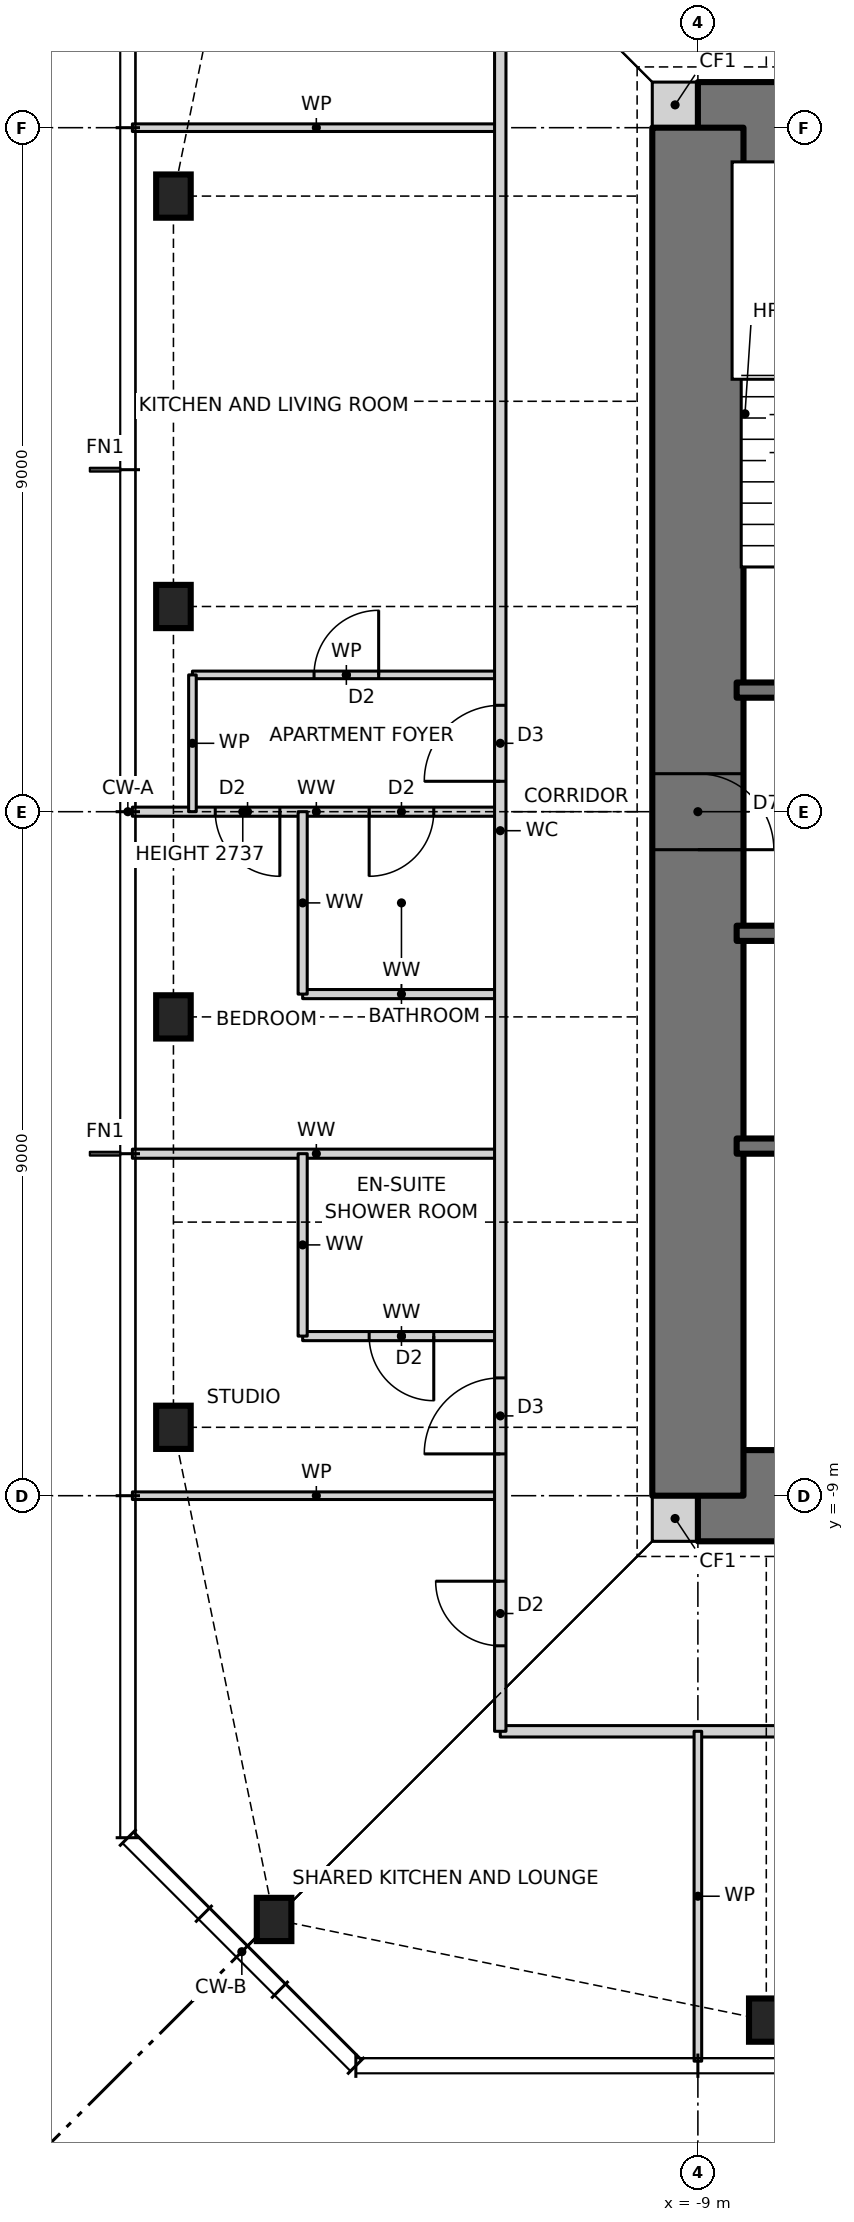
"""IFC4 building model, lengths in metres.
Left out: names, types, materials, properties, quantities, classifications, styles, units other than length and angle.
Written with IfcOpenShell. Run it as: python <this file> out.ifc"""

import sys

from ifc_helpers import new_model, si_unit, direction, frame, frame_2d, origin, origin_2d, place, context, subcontext, project, spatial, rectangle, i_section, extrude, element, fill, save


model = new_model("IFC4")
c1 = context("Model", 3, precision=1e-05, world=origin(), true_north=direction((0.0, 1.0)))
c2 = subcontext(c1, "Body", "Model", "MODEL_VIEW")
j1 = project(units=[si_unit("LENGTHUNIT", "METRE"), si_unit("PLANEANGLEUNIT", "RADIAN")], contexts=[c1])
p1 = place(None, origin())
s1 = spatial("IfcSite", under=j1, at=p1, CompositionType="ELEMENT")
p2 = place(p1, origin())
s2 = spatial("IfcBuilding", under=s1, at=p2, CompositionType="ELEMENT")
p3 = place(p2, frame((0.0, 0.0, 236.0)))
s3 = spatial("IfcBuildingStorey", under=s2, at=p3, CompositionType="ELEMENT", Elevation=236.0)
for number, where, z_axis, x_axis in (
    (1, (-14.576, -14.576, 0.0), (0.0, 0.0, 1.0), (1.0, 0.0, 0.0)),
    (2, (-8.1, -15.9, 0.0), (0.0, 0.0, 1.0), (1.0, 0.0, 0.0)),
    (3, (-15.9, 8.1, 0.0), (0.0, 0.0, 1.0), (1.0, 0.0, 0.0)),
    (4, (-15.9, 2.7, 0.0), (0.0, 0.0, 1.0), (1.0, 0.0, 0.0)),
    (5, (-15.9, -2.7, 0.0), (0.0, 0.0, 1.0), (1.0, 0.0, 0.0)),
    (6, (-15.9, -8.1, 0.0), (0.0, 0.0, 1.0), (1.0, 0.0, 0.0)),
):
    element("IfcColumn", number, at=place(p3, frame(where, z_axis=z_axis, x_axis=x_axis)), inside=s3, PredefinedType="COLUMN", context=c2, shape_type="SweptSolid", body=[
        extrude(i_section(OverallWidth=0.455, OverallDepth=0.569, WebThickness=0.078, FlangeThickness=0.125, at=origin_2d()), origin(), (0.0, 0.0, 1.0), 3.5),
    ])
for number, where, z_axis, x_axis in (
    (7, (-9.6, -9.3, 0.0), (0.0, 0.0, 1.0), (1.0, 0.0, 0.0)),
    (8, (-9.6, 9.3, 0.0), (0.0, 0.0, 1.0), (1.0, 0.0, 0.0)),
):
    element("IfcWall", number, at=place(p3, frame(where, z_axis=z_axis, x_axis=x_axis)), inside=s3, PredefinedType="SOLIDWALL", context=c2, shape_type="SweptSolid", body=[
        extrude(rectangle(XDim=0.6, YDim=0.6, at=frame_2d((0.3, 0.0))), origin(), (0.0, 0.0, 1.0), 3.5),
    ])
p4 = place(p3, frame((-9.0, -9.0, 0.0), z_axis=(0.0, 0.0, 1.0), x_axis=(1.0, 0.0, 0.0)))
e9 = element("IfcWall", 9, at=p4, inside=s3, PredefinedType="SHEAR", context=c2, shape_type="SweptSolid", body=[
    extrude(rectangle(XDim=18.0, YDim=1.2, at=frame_2d((9.0, 0.0))), origin(), (0.0, 0.0, 1.0), 3.5),
])
p5 = place(p4, frame((3.775, 0.0, 0.0)))
e10 = element("IfcOpeningElement", 10, at=p5, cuts=e9, PredefinedType="OPENING", context=c2, shape_type="SweptSolid", body=[
    extrude(rectangle(XDim=0.9, YDim=2.1, at=frame_2d((0.45, 1.05))), frame((0.0, 0.61, 0.0), z_axis=(0.0, -1.0, 0.0), x_axis=(1.0, 0.0, 0.0)), (0.0, 0.0, 1.0), 1.22),
])
p6 = place(p4, frame((10.625, 0.0, 0.0)))
e11 = element("IfcOpeningElement", 11, at=p6, cuts=e9, PredefinedType="OPENING", context=c2, shape_type="SweptSolid", body=[
    extrude(rectangle(XDim=0.9, YDim=2.1, at=frame_2d((0.45, 1.05))), frame((0.0, 0.61, 0.0), z_axis=(0.0, -1.0, 0.0), x_axis=(1.0, 0.0, 0.0)), (0.0, 0.0, 1.0), 1.22),
])
p7 = place(p3, frame((9.0, 9.0, 0.0), z_axis=(0.0, 0.0, 1.0), x_axis=(-1.0, 0.0, 0.0)))
e12 = element("IfcWall", 12, at=p7, inside=s3, PredefinedType="SHEAR", context=c2, shape_type="SweptSolid", body=[
    extrude(rectangle(XDim=18.0, YDim=1.2, at=frame_2d((9.0, 0.0))), origin(), (0.0, 0.0, 1.0), 3.5),
])
p8 = place(p7, frame((11.125, 0.0, 0.0)))
e13 = element("IfcOpeningElement", 13, at=p8, cuts=e12, PredefinedType="OPENING", context=c2, shape_type="SweptSolid", body=[
    extrude(rectangle(XDim=0.9, YDim=2.1, at=frame_2d((0.45, 1.05))), frame((0.0, 0.61, 0.0), z_axis=(0.0, -1.0, 0.0), x_axis=(1.0, 0.0, 0.0)), (0.0, 0.0, 1.0), 1.22),
])
p9 = place(p7, frame((4.275, 0.0, 0.0)))
e14 = element("IfcOpeningElement", 14, at=p9, cuts=e12, PredefinedType="OPENING", context=c2, shape_type="SweptSolid", body=[
    extrude(rectangle(XDim=0.9, YDim=2.1, at=frame_2d((0.45, 1.05))), frame((0.0, 0.61, 0.0), z_axis=(0.0, -1.0, 0.0), x_axis=(1.0, 0.0, 0.0)), (0.0, 0.0, 1.0), 1.22),
])
p10 = place(p3, frame((-9.0, 9.0, 0.0), z_axis=(0.0, 0.0, 1.0), x_axis=(0.0, -1.0, 0.0)))
e15 = element("IfcWall", 15, at=p10, inside=s3, PredefinedType="SHEAR", context=c2, shape_type="SweptSolid", body=[
    extrude(rectangle(XDim=18.0, YDim=1.2, at=frame_2d((9.0, 0.0))), origin(), (0.0, 0.0, 1.0), 3.5),
])
p11 = place(p10, frame((8.5, 0.0, 0.0)))
e16 = element("IfcOpeningElement", 16, at=p11, cuts=e15, PredefinedType="OPENING", context=c2, shape_type="SweptSolid", body=[
    extrude(rectangle(XDim=1.0, YDim=2.1, at=frame_2d((0.5, 1.05))), frame((0.0, 0.61, 0.0), z_axis=(0.0, -1.0, 0.0), x_axis=(1.0, 0.0, 0.0)), (0.0, 0.0, 1.0), 1.22),
])
p12 = place(p3, frame((-11.6, -12.1, 0.0), z_axis=(0.0, 0.0, 1.0), x_axis=(1.0, 0.0, 0.0)))
e17 = element("IfcWall", 17, at=p12, inside=s3, PredefinedType="PARTITIONING", context=c2, shape_type="SweptSolid", body=[
    extrude(rectangle(XDim=23.2, YDim=0.15, at=frame_2d((11.6, 0.0))), origin(), (0.0, 0.0, 1.0), 3.27),
])
p13 = place(p12, frame((10.2, 0.0, 0.0)))
e18 = element("IfcOpeningElement", 18, at=p13, cuts=e17, PredefinedType="OPENING", context=c2, shape_type="SweptSolid", body=[
    extrude(rectangle(XDim=1.0, YDim=2.1, at=frame_2d((0.5, 1.05))), frame((0.0, 0.085, 0.0), z_axis=(0.0, -1.0, 0.0), x_axis=(1.0, 0.0, 0.0)), (0.0, 0.0, 1.0), 0.17),
])
p14 = place(p12, frame((17.45, 0.0, 0.0)))
e19 = element("IfcOpeningElement", 19, at=p14, cuts=e17, PredefinedType="OPENING", context=c2, shape_type="SweptSolid", body=[
    extrude(rectangle(XDim=1.8, YDim=2.1, at=frame_2d((0.9, 1.05))), frame((0.0, 0.085, 0.0), z_axis=(0.0, -1.0, 0.0), x_axis=(1.0, 0.0, 0.0)), (0.0, 0.0, 1.0), 0.17),
])
p15 = place(p3, frame((-16.44, -9.0, 0.0), z_axis=(0.0, 0.0, 1.0), x_axis=(1.0, 0.0, 0.0)))
e20 = element("IfcWall", 20, at=p15, inside=s3, PredefinedType="PARTITIONING", context=c2, shape_type="SweptSolid", body=[
    extrude(rectangle(XDim=4.84, YDim=0.1, at=frame_2d((2.42, 0.0))), origin(), (0.0, 0.0, 1.0), 3.27),
])
p16 = place(p3, frame((-14.2, -6.9, 0.0), z_axis=(0.0, 0.0, 1.0), x_axis=(1.0, 0.0, 0.0)))
e21 = element("IfcWall", 21, at=p16, inside=s3, PredefinedType="PARTITIONING", context=c2, shape_type="SweptSolid", body=[
    extrude(rectangle(XDim=2.6, YDim=0.12, at=frame_2d((1.3, 0.0))), origin(), (0.0, 0.0, 1.0), 3.27),
])
p17 = place(p16, frame((0.875, 0.0, 0.0)))
e22 = element("IfcOpeningElement", 22, at=p17, cuts=e21, PredefinedType="OPENING", context=c2, shape_type="SweptSolid", body=[
    extrude(rectangle(XDim=0.85, YDim=2.1, at=frame_2d((0.425, 1.05))), frame((0.0, 0.07, 0.0), z_axis=(0.0, -1.0, 0.0), x_axis=(1.0, 0.0, 0.0)), (0.0, 0.0, 1.0), 0.14),
])
p18 = place(p3, frame((-16.44, -4.5, 0.0), z_axis=(0.0, 0.0, 1.0), x_axis=(1.0, 0.0, 0.0)))
e23 = element("IfcWall", 23, at=p18, inside=s3, PredefinedType="PARTITIONING", context=c2, shape_type="SweptSolid", body=[
    extrude(rectangle(XDim=4.84, YDim=0.12, at=frame_2d((2.42, 0.0))), origin(), (0.0, 0.0, 1.0), 3.27),
])
p19 = place(p3, frame((-8.49, -4.4, 0.0), z_axis=(0.0, 0.0, 1.0), x_axis=(1.0, 0.0, 0.0)))
e24 = element("IfcWall", 24, at=p19, inside=s3, PredefinedType="SOLIDWALL", context=c2, shape_type="SweptSolid", body=[
    extrude(rectangle(XDim=13.64, YDim=0.2, at=frame_2d((6.82, 0.0))), origin(), (0.0, 0.0, 1.0), 3.5),
])
p20 = place(p3, frame((-14.2, -2.4, 0.0), z_axis=(0.0, 0.0, 1.0), x_axis=(1.0, 0.0, 0.0)))
e25 = element("IfcWall", 25, at=p20, inside=s3, PredefinedType="PARTITIONING", context=c2, shape_type="SweptSolid", body=[
    extrude(rectangle(XDim=2.6, YDim=0.12, at=frame_2d((1.3, 0.0))), origin(), (0.0, 0.0, 1.0), 3.27),
])
p21 = place(p3, frame((-8.49, -1.6, 0.0), z_axis=(0.0, 0.0, 1.0), x_axis=(1.0, 0.0, 0.0)))
e26 = element("IfcWall", 26, at=p21, inside=s3, PredefinedType="SOLIDWALL", context=c2, shape_type="SweptSolid", body=[
    extrude(rectangle(XDim=16.98, YDim=0.2, at=frame_2d((8.49, 0.0))), origin(), (0.0, 0.0, 1.0), 3.5),
])
p22 = place(p21, frame((14.81, 0.0, 0.0)))
e27 = element("IfcOpeningElement", 27, at=p22, cuts=e26, PredefinedType="OPENING", context=c2, shape_type="SweptSolid", body=[
    extrude(rectangle(XDim=1.0, YDim=2.1, at=frame_2d((0.5, 1.05))), frame((0.0, 0.11, 0.0), z_axis=(0.0, -1.0, 0.0), x_axis=(1.0, 0.0, 0.0)), (0.0, 0.0, 1.0), 0.22),
])
p23 = place(p21, frame((1.232, 0.0, 0.0)))
e28 = element("IfcOpeningElement", 28, at=p23, cuts=e26, PredefinedType="OPENING", context=c2, shape_type="SweptSolid", body=[
    extrude(rectangle(XDim=0.9, YDim=2.1, at=frame_2d((0.45, 1.05))), frame((0.0, 0.11, 0.0), z_axis=(0.0, -1.0, 0.0), x_axis=(1.0, 0.0, 0.0)), (0.0, 0.0, 1.0), 0.22),
])
p24 = place(p21, frame((4.627, 0.0, 0.0)))
e29 = element("IfcOpeningElement", 29, at=p24, cuts=e26, PredefinedType="OPENING", context=c2, shape_type="SweptSolid", body=[
    extrude(rectangle(XDim=0.9, YDim=2.1, at=frame_2d((0.45, 1.05))), frame((0.0, 0.11, 0.0), z_axis=(0.0, -1.0, 0.0), x_axis=(1.0, 0.0, 0.0)), (0.0, 0.0, 1.0), 0.22),
])
p25 = place(p21, frame((8.052, 0.0, 0.0)))
e30 = element("IfcOpeningElement", 30, at=p25, cuts=e26, PredefinedType="OPENING", context=c2, shape_type="SweptSolid", body=[
    extrude(rectangle(XDim=0.9, YDim=2.1, at=frame_2d((0.45, 1.05))), frame((0.0, 0.11, 0.0), z_axis=(0.0, -1.0, 0.0), x_axis=(1.0, 0.0, 0.0)), (0.0, 0.0, 1.0), 0.22),
])
p26 = place(p21, frame((11.478, 0.0, 0.0)))
e31 = element("IfcOpeningElement", 31, at=p26, cuts=e26, PredefinedType="OPENING", context=c2, shape_type="SweptSolid", body=[
    extrude(rectangle(XDim=0.9, YDim=2.1, at=frame_2d((0.45, 1.05))), frame((0.0, 0.11, 0.0), z_axis=(0.0, -1.0, 0.0), x_axis=(1.0, 0.0, 0.0)), (0.0, 0.0, 1.0), 0.22),
])
p27 = place(p3, frame((-16.44, 0.0, 0.0), z_axis=(0.0, 0.0, 1.0), x_axis=(1.0, 0.0, 0.0)))
e32 = element("IfcWall", 32, at=p27, inside=s3, PredefinedType="PARTITIONING", context=c2, shape_type="SweptSolid", body=[
    extrude(rectangle(XDim=4.84, YDim=0.12, at=frame_2d((2.42, 0.0))), origin(), (0.0, 0.0, 1.0), 2.737),
])
p28 = place(p27, frame((1.09, 0.0, 0.0)))
e33 = element("IfcOpeningElement", 33, at=p28, cuts=e32, PredefinedType="OPENING", context=c2, shape_type="SweptSolid", body=[
    extrude(rectangle(XDim=0.85, YDim=2.1, at=frame_2d((0.425, 1.05))), frame((0.0, 0.07, 0.0), z_axis=(0.0, -1.0, 0.0), x_axis=(1.0, 0.0, 0.0)), (0.0, 0.0, 1.0), 0.14),
])
p29 = place(p27, frame((3.115, 0.0, 0.0)))
e34 = element("IfcOpeningElement", 34, at=p29, cuts=e32, PredefinedType="OPENING", context=c2, shape_type="SweptSolid", body=[
    extrude(rectangle(XDim=0.85, YDim=2.1, at=frame_2d((0.425, 1.05))), frame((0.0, 0.07, 0.0), z_axis=(0.0, -1.0, 0.0), x_axis=(1.0, 0.0, 0.0)), (0.0, 0.0, 1.0), 0.14),
])
p30 = place(p3, frame((-8.49, 1.6, 0.0), z_axis=(0.0, 0.0, 1.0), x_axis=(1.0, 0.0, 0.0)))
e35 = element("IfcWall", 35, at=p30, inside=s3, PredefinedType="SOLIDWALL", context=c2, shape_type="SweptSolid", body=[
    extrude(rectangle(XDim=16.98, YDim=0.2, at=frame_2d((8.49, 0.0))), origin(), (0.0, 0.0, 1.0), 3.5),
])
p31 = place(p30, frame((1.17, 0.0, 0.0)))
e36 = element("IfcOpeningElement", 36, at=p31, cuts=e35, PredefinedType="OPENING", context=c2, shape_type="SweptSolid", body=[
    extrude(rectangle(XDim=1.0, YDim=2.1, at=frame_2d((0.5, 1.05))), frame((0.0, 0.11, 0.0), z_axis=(0.0, -1.0, 0.0), x_axis=(1.0, 0.0, 0.0)), (0.0, 0.0, 1.0), 0.22),
])
p32 = place(p30, frame((4.606, 0.0, 0.0)))
e37 = element("IfcOpeningElement", 37, at=p32, cuts=e35, PredefinedType="OPENING", context=c2, shape_type="SweptSolid", body=[
    extrude(rectangle(XDim=0.9, YDim=2.1, at=frame_2d((0.45, 1.05))), frame((0.0, 0.11, 0.0), z_axis=(0.0, -1.0, 0.0), x_axis=(1.0, 0.0, 0.0)), (0.0, 0.0, 1.0), 0.22),
])
p33 = place(p30, frame((8.04, 0.0, 0.0)))
e38 = element("IfcOpeningElement", 38, at=p33, cuts=e35, PredefinedType="OPENING", context=c2, shape_type="SweptSolid", body=[
    extrude(rectangle(XDim=0.9, YDim=2.1, at=frame_2d((0.45, 1.05))), frame((0.0, 0.11, 0.0), z_axis=(0.0, -1.0, 0.0), x_axis=(1.0, 0.0, 0.0)), (0.0, 0.0, 1.0), 0.22),
])
p34 = place(p30, frame((11.374, 0.0, 0.0)))
e39 = element("IfcOpeningElement", 39, at=p34, cuts=e35, PredefinedType="OPENING", context=c2, shape_type="SweptSolid", body=[
    extrude(rectangle(XDim=1.1, YDim=2.1, at=frame_2d((0.55, 1.05))), frame((0.0, 0.11, 0.0), z_axis=(0.0, -1.0, 0.0), x_axis=(1.0, 0.0, 0.0)), (0.0, 0.0, 1.0), 0.22),
])
p35 = place(p30, frame((14.66, 0.0, 0.0)))
e40 = element("IfcOpeningElement", 40, at=p35, cuts=e35, PredefinedType="OPENING", context=c2, shape_type="SweptSolid", body=[
    extrude(rectangle(XDim=1.3, YDim=2.1, at=frame_2d((0.65, 1.05))), frame((0.0, 0.11, 0.0), z_axis=(0.0, -1.0, 0.0), x_axis=(1.0, 0.0, 0.0)), (0.0, 0.0, 1.0), 0.22),
])
p36 = place(p3, frame((-15.65, 1.8, 0.0), z_axis=(0.0, 0.0, 1.0), x_axis=(1.0, 0.0, 0.0)))
e41 = element("IfcWall", 41, at=p36, inside=s3, PredefinedType="PARTITIONING", context=c2, shape_type="SweptSolid", body=[
    extrude(rectangle(XDim=4.05, YDim=0.1, at=frame_2d((2.025, 0.0))), origin(), (0.0, 0.0, 1.0), 3.27),
])
p37 = place(p36, frame((1.6, 0.0, 0.0)))
e42 = element("IfcOpeningElement", 42, at=p37, cuts=e41, PredefinedType="OPENING", context=c2, shape_type="SweptSolid", body=[
    extrude(rectangle(XDim=0.85, YDim=2.1, at=frame_2d((0.425, 1.05))), frame((0.0, 0.06, 0.0), z_axis=(0.0, -1.0, 0.0), x_axis=(1.0, 0.0, 0.0)), (0.0, 0.0, 1.0), 0.12),
])
p38 = place(p3, frame((-16.44, 9.0, 0.0), z_axis=(0.0, 0.0, 1.0), x_axis=(1.0, 0.0, 0.0)))
e43 = element("IfcWall", 43, at=p38, inside=s3, PredefinedType="PARTITIONING", context=c2, shape_type="SweptSolid", body=[
    extrude(rectangle(XDim=4.84, YDim=0.1, at=frame_2d((2.42, 0.0))), origin(), (0.0, 0.0, 1.0), 3.27),
])
p39 = place(p3, frame((-9.0, -16.44, 0.0), z_axis=(0.0, 0.0, 1.0), x_axis=(0.0, 1.0, 0.0)))
e44 = element("IfcWall", 44, at=p39, inside=s3, PredefinedType="PARTITIONING", context=c2, shape_type="SweptSolid", body=[
    extrude(rectangle(XDim=4.34, YDim=0.1, at=frame_2d((2.17, 0.0))), origin(), (0.0, 0.0, 1.0), 3.27),
])
p40 = place(p3, frame((-11.6, -12.1, 0.0), z_axis=(0.0, 0.0, 1.0), x_axis=(0.0, 1.0, 0.0)))
e45 = element("IfcWall", 45, at=p40, inside=s3, PredefinedType="PARTITIONING", context=c2, shape_type="SweptSolid", body=[
    extrude(rectangle(XDim=23.7, YDim=0.15, at=frame_2d((11.85, 0.0))), origin(), (0.0, 0.0, 1.0), 3.27),
])
p41 = place(p40, frame((12.5, 0.0, 0.0)))
e46 = element("IfcOpeningElement", 46, at=p41, cuts=e45, PredefinedType="OPENING", context=c2, shape_type="SweptSolid", body=[
    extrude(rectangle(XDim=1.0, YDim=2.1, at=frame_2d((0.5, 1.05))), frame((0.0, 0.085, 0.0), z_axis=(0.0, -1.0, 0.0), x_axis=(1.0, 0.0, 0.0)), (0.0, 0.0, 1.0), 0.17),
])
p42 = place(p40, frame((3.65, 0.0, 0.0)))
e47 = element("IfcOpeningElement", 47, at=p42, cuts=e45, PredefinedType="OPENING", context=c2, shape_type="SweptSolid", body=[
    extrude(rectangle(XDim=1.0, YDim=2.1, at=frame_2d((0.5, 1.05))), frame((0.0, 0.085, 0.0), z_axis=(0.0, -1.0, 0.0), x_axis=(1.0, 0.0, 0.0)), (0.0, 0.0, 1.0), 0.17),
])
p43 = place(p40, frame((1.125, 0.0, 0.0)))
e48 = element("IfcOpeningElement", 48, at=p43, cuts=e45, PredefinedType="OPENING", context=c2, shape_type="SweptSolid", body=[
    extrude(rectangle(XDim=0.85, YDim=2.1, at=frame_2d((0.425, 1.05))), frame((0.0, 0.085, 0.0), z_axis=(0.0, -1.0, 0.0), x_axis=(1.0, 0.0, 0.0)), (0.0, 0.0, 1.0), 0.17),
])
for number, where, z_axis, x_axis in (
    (49, (-14.2, -6.9, 0.0), (0.0, 0.0, 1.0), (0.0, 1.0, 0.0)),
    (50, (-14.2, -2.4, 0.0), (0.0, 0.0, 1.0), (0.0, 1.0, 0.0)),
):
    element("IfcWall", number, at=place(p3, frame(where, z_axis=z_axis, x_axis=x_axis)), inside=s3, PredefinedType="PARTITIONING", context=c2, shape_type="SweptSolid", body=[
        extrude(rectangle(XDim=2.4, YDim=0.12, at=frame_2d((1.2, 0.0))), origin(), (0.0, 0.0, 1.0), 3.27),
    ])
p44 = place(p3, frame((-15.65, 0.0, 0.0), z_axis=(0.0, 0.0, 1.0), x_axis=(0.0, 1.0, 0.0)))
e51 = element("IfcWall", 51, at=p44, inside=s3, PredefinedType="PARTITIONING", context=c2, shape_type="SweptSolid", body=[
    extrude(rectangle(XDim=1.8, YDim=0.1, at=frame_2d((0.9, 0.0))), origin(), (0.0, 0.0, 1.0), 3.27),
])
p45 = place(p41, origin())
e52 = element("IfcDoor", 52, at=p45, inside=s3, OperationType="SINGLE_SWING_LEFT", PredefinedType="DOOR", context=c2, shape_type="SweptSolid", body=[
    extrude(rectangle(XDim=1.0, YDim=2.1, at=frame_2d((0.5, 1.05))), frame((0.0, 0.025, 0.0), z_axis=(0.0, -1.0, 0.0), x_axis=(1.0, 0.0, 0.0)), (0.0, 0.0, 1.0), 0.05),
])
fill(e46, e52)
p46 = place(p37, origin())
e53 = element("IfcDoor", 53, at=p46, inside=s3, OperationType="SINGLE_SWING_RIGHT", PredefinedType="DOOR", context=c2, shape_type="SweptSolid", body=[
    extrude(rectangle(XDim=0.85, YDim=2.1, at=frame_2d((0.425, 1.05))), frame((0.0, 0.025, 0.0), z_axis=(0.0, -1.0, 0.0), x_axis=(1.0, 0.0, 0.0)), (0.0, 0.0, 1.0), 0.05),
])
fill(e42, e53)
p47 = place(p28, frame((0.85, 0.0, 0.0), z_axis=(0.0, 0.0, 1.0), x_axis=(-1.0, 0.0, 0.0)))
e54 = element("IfcDoor", 54, at=p47, inside=s3, OperationType="SINGLE_SWING_LEFT", PredefinedType="DOOR", context=c2, shape_type="SweptSolid", body=[
    extrude(rectangle(XDim=0.85, YDim=2.1, at=frame_2d((0.425, 1.05))), frame((0.0, 0.025, 0.0), z_axis=(0.0, -1.0, 0.0), x_axis=(1.0, 0.0, 0.0)), (0.0, 0.0, 1.0), 0.05),
])
fill(e33, e54)
p48 = place(p29, frame((0.85, 0.0, 0.0), z_axis=(0.0, 0.0, 1.0), x_axis=(-1.0, 0.0, 0.0)))
e55 = element("IfcDoor", 55, at=p48, inside=s3, OperationType="SINGLE_SWING_RIGHT", PredefinedType="DOOR", context=c2, shape_type="SweptSolid", body=[
    extrude(rectangle(XDim=0.85, YDim=2.1, at=frame_2d((0.425, 1.05))), frame((0.0, 0.025, 0.0), z_axis=(0.0, -1.0, 0.0), x_axis=(1.0, 0.0, 0.0)), (0.0, 0.0, 1.0), 0.05),
])
fill(e34, e55)
p49 = place(p42, origin())
e56 = element("IfcDoor", 56, at=p49, inside=s3, OperationType="SINGLE_SWING_LEFT", PredefinedType="DOOR", context=c2, shape_type="SweptSolid", body=[
    extrude(rectangle(XDim=1.0, YDim=2.1, at=frame_2d((0.5, 1.05))), frame((0.0, 0.025, 0.0), z_axis=(0.0, -1.0, 0.0), x_axis=(1.0, 0.0, 0.0)), (0.0, 0.0, 1.0), 0.05),
])
fill(e47, e56)
p50 = place(p17, frame((0.85, 0.0, 0.0), z_axis=(0.0, 0.0, 1.0), x_axis=(-1.0, 0.0, 0.0)))
e57 = element("IfcDoor", 57, at=p50, inside=s3, OperationType="SINGLE_SWING_LEFT", PredefinedType="DOOR", context=c2, shape_type="SweptSolid", body=[
    extrude(rectangle(XDim=0.85, YDim=2.1, at=frame_2d((0.425, 1.05))), frame((0.0, 0.025, 0.0), z_axis=(0.0, -1.0, 0.0), x_axis=(1.0, 0.0, 0.0)), (0.0, 0.0, 1.0), 0.05),
])
fill(e22, e57)
p51 = place(p43, origin())
e58 = element("IfcDoor", 58, at=p51, inside=s3, OperationType="SINGLE_SWING_RIGHT", PredefinedType="DOOR", context=c2, shape_type="SweptSolid", body=[
    extrude(rectangle(XDim=0.85, YDim=2.1, at=frame_2d((0.425, 1.05))), frame((0.0, 0.025, 0.0), z_axis=(0.0, -1.0, 0.0), x_axis=(1.0, 0.0, 0.0)), (0.0, 0.0, 1.0), 0.05),
])
fill(e48, e58)
p52 = place(p11, origin())
e59 = element("IfcDoor", 59, at=p52, inside=s3, OperationType="SINGLE_SWING_RIGHT", PredefinedType="DOOR", context=c2, shape_type="SweptSolid", body=[
    extrude(rectangle(XDim=1.0, YDim=2.1, at=frame_2d((0.5, 1.05))), frame((0.0, 0.025, 0.0), z_axis=(0.0, -1.0, 0.0), x_axis=(1.0, 0.0, 0.0)), (0.0, 0.0, 1.0), 0.05),
])
fill(e16, e59)
save(model, sys.argv[1])
